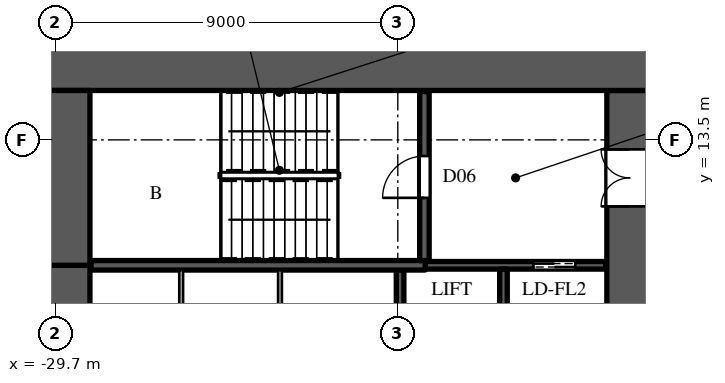
"""IFC4 building model, lengths in metres.
Left out: names, types, materials, properties, quantities, classifications, styles, units other than length and angle.
Written with IfcOpenShell. Run it as: python <this file> out.ifc"""

import sys

from ifc_helpers import new_model, si_unit, direction, frame, frame_2d, origin, place, context, subcontext, project, spatial, rectangle, extrude, element, fill, save


model = new_model("IFC4")
c1 = context("Model", 3, precision=1e-05, world=origin(), true_north=direction((0.0, 1.0)))
c2 = subcontext(c1, "Body", "Model", "MODEL_VIEW")
j1 = project(units=[si_unit("LENGTHUNIT", "METRE"), si_unit("PLANEANGLEUNIT", "RADIAN")], contexts=[c1])
p1 = place(None, origin())
s1 = spatial("IfcSite", under=j1, at=p1, CompositionType="ELEMENT")
p2 = place(p1, origin())
s2 = spatial("IfcBuilding", under=s1, at=p2, CompositionType="ELEMENT")
p3 = place(p2, frame((0.0, 0.0, 36.0)))
s3 = spatial("IfcBuildingStorey", under=s2, at=p3, CompositionType="ELEMENT", Elevation=36.0)
p4 = place(p3, frame((-30.0, 15.4, 0.0), z_axis=(0.0, 0.0, 1.0), x_axis=(1.0, 0.0, 0.0)))
e1 = element("IfcWall", 1, at=p4, inside=s3, PredefinedType="SHEAR", context=c2, shape_type="SweptSolid", body=[
    extrude(rectangle(XDim=16.0, YDim=1.2, at=frame_2d((8.0, 0.0))), origin(), (0.0, 0.0, 1.0), 8.0),
])
p5 = place(p3, frame((-14.6, -14.8, 0.0), z_axis=(0.0, 0.0, 1.0), x_axis=(0.0, 1.0, 0.0)))
e2 = element("IfcWall", 2, at=p5, inside=s3, PredefinedType="SHEAR", context=c2, shape_type="SweptSolid", body=[
    extrude(rectangle(XDim=29.6, YDim=1.2, at=frame_2d((14.8, 0.0))), origin(), (0.0, 0.0, 1.0), 8.0),
])
p6 = place(p5, frame((1.55, 0.0, 0.0)))
e3 = element("IfcOpeningElement", 3, at=p6, cuts=e2, PredefinedType="OPENING", context=c2, shape_type="SweptSolid", body=[
    extrude(rectangle(XDim=1.5, YDim=2.4, at=frame_2d((0.75, 1.2))), frame((0.0, 0.61, 0.0), z_axis=(0.0, -1.0, 0.0), x_axis=(1.0, 0.0, 0.0)), (0.0, 0.0, 1.0), 1.22),
])
p7 = place(p5, frame((26.55, 0.0, 0.0)))
e4 = element("IfcOpeningElement", 4, at=p7, cuts=e2, PredefinedType="OPENING", context=c2, shape_type="SweptSolid", body=[
    extrude(rectangle(XDim=1.5, YDim=2.4, at=frame_2d((0.75, 1.2))), frame((0.0, 0.61, 0.0), z_axis=(0.0, -1.0, 0.0), x_axis=(1.0, 0.0, 0.0)), (0.0, 0.0, 1.0), 1.22),
])
p8 = place(p5, frame((8.45, 0.0, 0.0)))
e5 = element("IfcOpeningElement", 5, at=p8, cuts=e2, PredefinedType="OPENING", context=c2, shape_type="SweptSolid", body=[
    extrude(rectangle(XDim=1.5, YDim=2.4, at=frame_2d((0.75, 1.2))), frame((0.0, 0.61, 0.0), z_axis=(0.0, -1.0, 0.0), x_axis=(1.0, 0.0, 0.0)), (0.0, 0.0, 1.0), 1.22),
])
p9 = place(p5, frame((19.65, 0.0, 0.0)))
e6 = element("IfcOpeningElement", 6, at=p9, cuts=e2, PredefinedType="OPENING", context=c2, shape_type="SweptSolid", body=[
    extrude(rectangle(XDim=1.5, YDim=2.4, at=frame_2d((0.75, 1.2))), frame((0.0, 0.61, 0.0), z_axis=(0.0, -1.0, 0.0), x_axis=(1.0, 0.0, 0.0)), (0.0, 0.0, 1.0), 1.22),
])
p10 = place(p5, frame((14.5, 0.0, 0.0)))
e7 = element("IfcOpeningElement", 7, at=p10, cuts=e2, PredefinedType="OPENING", context=c2, shape_type="SweptSolid", body=[
    extrude(rectangle(XDim=0.6, YDim=2.0, at=frame_2d((0.3, 1.0))), frame((0.0, 0.61, 0.0), z_axis=(0.0, -1.0, 0.0), x_axis=(1.0, 0.0, 0.0)), (0.0, 0.0, 1.0), 1.22),
])
p11 = place(p3, frame((-29.4, -10.2, 0.0), z_axis=(0.0, 0.0, 1.0), x_axis=(0.0, 1.0, 0.0)))
e8 = element("IfcWall", 8, at=p11, inside=s3, PredefinedType="SHEAR", context=c2, shape_type="SweptSolid", body=[
    extrude(rectangle(XDim=20.4, YDim=1.2, at=frame_2d((10.2, 0.0))), origin(), (0.0, 0.0, 1.0), 8.0),
])
p12 = place(p3, frame((-29.4, 10.2, 0.0), z_axis=(0.0, 0.0, 1.0), x_axis=(0.0, 1.0, 0.0)))
e9 = element("IfcWall", 9, at=p12, inside=s3, PredefinedType="SHEAR", context=c2, shape_type="SweptSolid", body=[
    extrude(rectangle(XDim=4.6, YDim=1.2, at=frame_2d((2.3, 0.0))), origin(), (0.0, 0.0, 1.0), 8.0),
])
p13 = place(p3, frame((-20.64, 7.5, 0.0), z_axis=(0.0, 0.0, 1.0), x_axis=(0.0, 1.0, 0.0)))
e10 = element("IfcWall", 10, at=p13, inside=s3, PredefinedType="SHEAR", context=c2, shape_type="SweptSolid", body=[
    extrude(rectangle(XDim=2.575, YDim=0.2, at=frame_2d((1.288, 0.0))), origin(), (0.0, 0.0, 1.0), 7.598),
])
p14 = place(p3, frame((-19.98, 10.2, 0.0), z_axis=(0.0, 0.0, 1.0), x_axis=(1.0, 0.0, 0.0)))
e11 = element("IfcWall", 11, at=p14, inside=s3, PredefinedType="SHEAR", context=c2, shape_type="SweptSolid", body=[
    extrude(rectangle(XDim=4.75, YDim=0.2, at=frame_2d((2.375, 0.0))), origin(), (0.0, 0.0, 1.0), 7.598),
])
p15 = place(p14, frame((2.85, 0.0, 0.0)))
e12 = element("IfcOpeningElement", 12, at=p15, cuts=e11, PredefinedType="OPENING", context=c2, shape_type="SweptSolid", body=[
    extrude(rectangle(XDim=1.1, YDim=2.2, at=frame_2d((0.55, 1.1))), frame((0.0, 0.11, 0.0), z_axis=(0.0, -1.0, 0.0), x_axis=(1.0, 0.0, 0.0)), (0.0, 0.0, 1.0), 0.22),
])
p16 = place(p3, frame((-17.92, 7.5, 0.0), z_axis=(0.0, 0.0, 1.0), x_axis=(0.0, 1.0, 0.0)))
e13 = element("IfcWall", 13, at=p16, inside=s3, PredefinedType="SHEAR", context=c2, shape_type="SweptSolid", body=[
    extrude(rectangle(XDim=2.6, YDim=0.2, at=frame_2d((1.3, 0.0))), origin(), (0.0, 0.0, 1.0), 8.0),
])
p17 = place(p3, frame((-28.77, 10.2, 0.0), z_axis=(0.0, 0.0, 1.0), x_axis=(1.0, 0.0, 0.0)))
e14 = element("IfcWall", 14, at=p17, inside=s3, PredefinedType="SHEAR", context=c2, shape_type="SweptSolid", body=[
    extrude(rectangle(XDim=8.79, YDim=0.25, at=frame_2d((4.395, 0.0))), origin(), (0.0, 0.0, 1.0), 7.598),
])
p18 = place(p3, frame((-20.0, 10.325, 0.0), z_axis=(0.0, 0.0, 1.0), x_axis=(0.0, 1.0, 0.0)))
e15 = element("IfcWall", 15, at=p18, inside=s3, PredefinedType="SHEAR", context=c2, shape_type="SweptSolid", body=[
    extrude(rectangle(XDim=4.445, YDim=0.25, at=frame_2d((2.223, 0.0))), origin(), (0.0, 0.0, 1.0), 7.598),
])
p19 = place(p18, frame((1.65, 0.0, 0.0)))
e16 = element("IfcOpeningElement", 16, at=p19, cuts=e15, PredefinedType="OPENING", context=c2, shape_type="SweptSolid", body=[
    extrude(rectangle(XDim=1.1, YDim=2.2, at=frame_2d((0.55, 1.1))), frame((0.0, 0.135, 0.0), z_axis=(0.0, -1.0, 0.0), x_axis=(1.0, 0.0, 0.0)), (0.0, 0.0, 1.0), 0.27),
])
for number, where, z_axis, x_axis in (
    (17, (-26.4, 7.5, 0.0), (0.0, 0.0, 1.0), (0.0, 1.0, 0.0)),
    (18, (-23.8, 7.5, 0.0), (0.0, 0.0, 1.0), (0.0, 1.0, 0.0)),
):
    element("IfcWall", number, at=place(p3, frame(where, z_axis=z_axis, x_axis=x_axis)), inside=s3, PredefinedType="PARTITIONING", context=c2, shape_type="SweptSolid", body=[
        extrude(rectangle(XDim=2.575, YDim=0.1, at=frame_2d((1.288, 0.0))), origin(), (0.0, 0.0, 1.0), 7.598),
    ])
p20 = place(p19, origin())
e19 = element("IfcDoor", 19, at=p20, inside=s3, OperationType="SINGLE_SWING_LEFT", PredefinedType="DOOR", context=c2, shape_type="SweptSolid", body=[
    extrude(rectangle(XDim=1.1, YDim=2.2, at=frame_2d((0.55, 1.1))), frame((0.0, 0.025, 0.0), z_axis=(0.0, -1.0, 0.0), x_axis=(1.0, 0.0, 0.0)), (0.0, 0.0, 1.0), 0.05),
])
fill(e16, e19)
p21 = place(p15, origin())
e20 = element("IfcDoor", 20, at=p21, inside=s3, OperationType="DOUBLE_DOOR_SLIDING", PredefinedType="DOOR", context=c2, shape_type="SweptSolid", body=[
    extrude(rectangle(XDim=1.1, YDim=2.2, at=frame_2d((0.55, 1.1))), frame((0.0, 0.025, 0.0), z_axis=(0.0, -1.0, 0.0), x_axis=(1.0, 0.0, 0.0)), (0.0, 0.0, 1.0), 0.05),
])
fill(e12, e20)
p22 = place(p7, origin())
e21 = element("IfcDoor", 21, at=p22, inside=s3, OperationType="DOUBLE_DOOR_SINGLE_SWING", PredefinedType="DOOR", context=c2, shape_type="SweptSolid", body=[
    extrude(rectangle(XDim=1.5, YDim=2.4, at=frame_2d((0.75, 1.2))), frame((0.0, 0.025, 0.0), z_axis=(0.0, -1.0, 0.0), x_axis=(1.0, 0.0, 0.0)), (0.0, 0.0, 1.0), 0.05),
])
fill(e4, e21)
save(model, sys.argv[1])
